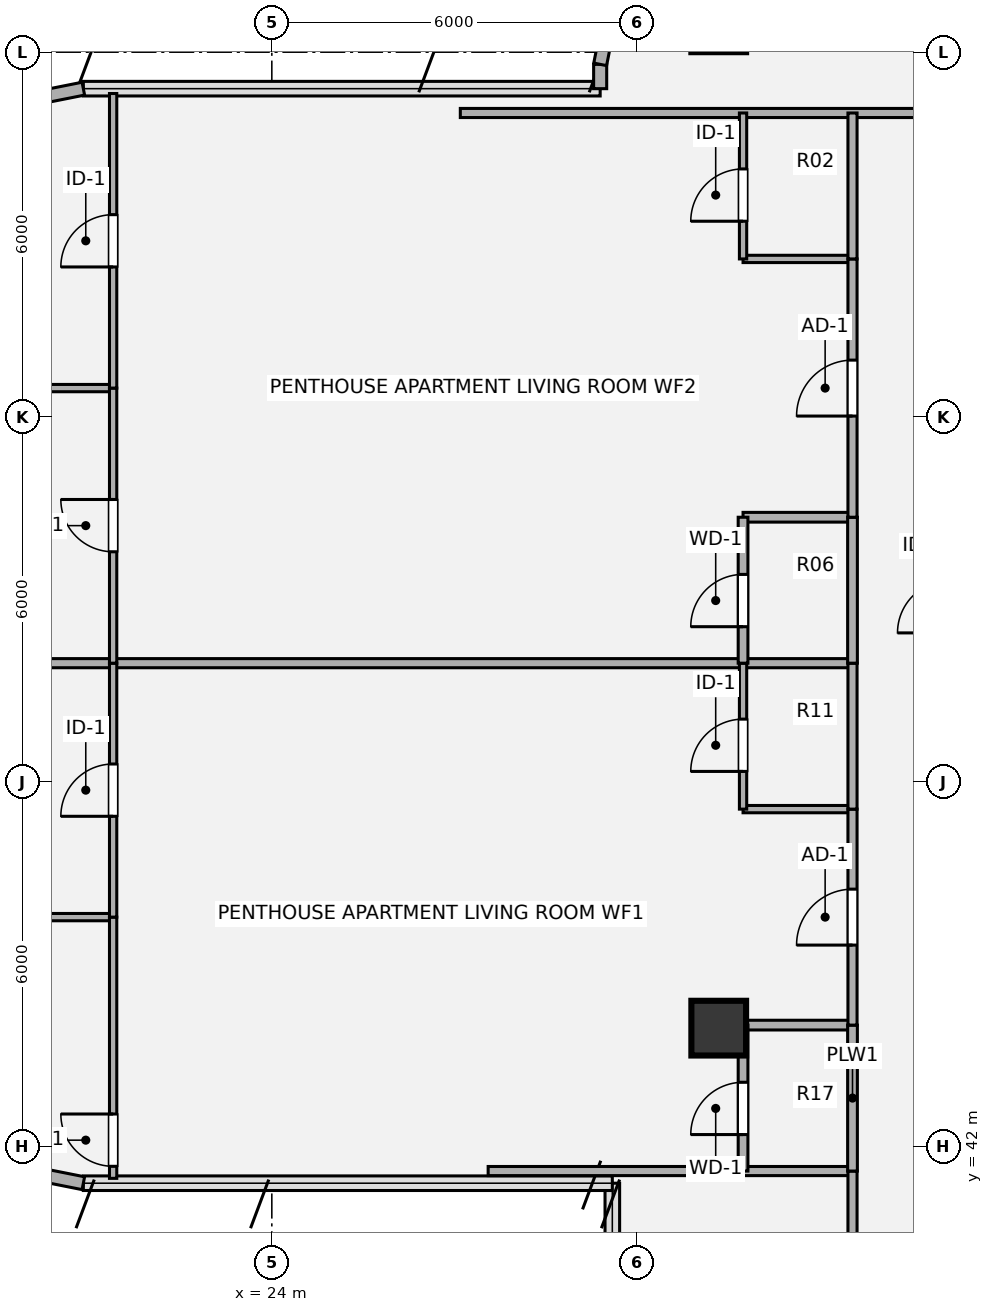
"""IFC4 building model, lengths in metres.
Left out: names, types, materials, properties, quantities, classifications, styles, units other than length and angle.
Written with IfcOpenShell. Run it as: python <this file> out.ifc"""

import sys

from ifc_helpers import new_model, si_unit, direction, frame, frame_2d, origin, origin_2d, place, context, subcontext, project, spatial, rectangle, hollow_circle, extrude, source, transform, mapped, element, fill, save


model = new_model("IFC4")
c1 = context("Model", 3, precision=1e-05, world=origin(), true_north=direction((0.0, 1.0)))
c2 = subcontext(c1, "Body", "Model", "MODEL_VIEW")
j1 = project(units=[si_unit("LENGTHUNIT", "METRE"), si_unit("PLANEANGLEUNIT", "RADIAN")], contexts=[c1])
p1 = place(None, origin())
s1 = spatial("IfcSite", under=j1, at=p1, CompositionType="ELEMENT")
p2 = place(p1, origin())
s2 = spatial("IfcBuilding", under=s1, at=p2, CompositionType="ELEMENT")
p3 = place(p2, frame((0.0, 0.0, 223.02)))
s3 = spatial("IfcBuildingStorey", under=s2, at=p3, CompositionType="ELEMENT", Elevation=223.02)
m1 = source(origin(), c2, "Body", "SweptSolid", [
    extrude(hollow_circle(Radius=0.45, WallThickness=0.032, at=origin_2d()), origin(), (0.0, 0.0, 1.0), 3.78),
])
p4 = place(p3, frame((31.35, 43.95, 0.0), z_axis=(0.0, 0.0, 1.0), x_axis=(1.0, 0.0, 0.0)))
e1 = element("IfcColumn", 1, at=p4, inside=s3, PredefinedType="COLUMN", context=c2, shape_type="MappedRepresentation", body=[
    mapped(m1, transform((0.0, 0.0, 0.0), x_axis=(1.0, 0.0, 0.0), y_axis=(0.0, 1.0, 0.0), z_axis=(0.0, 0.0, 1.0), scale=1.0)),
])
for number, where, z_axis, x_axis in (
    (2, (20.9, 41.4, 0.0), (0.0, 0.0, 1.0), (-0.981, 0.195, 0.0)),
    (3, (19.675, 59.156, 0.0), (0.0, 0.0, 1.0), (0.981, 0.195, 0.0)),
):
    element("IfcWall", number, at=place(p3, frame(where, z_axis=z_axis, x_axis=x_axis)), inside=s3, PredefinedType="SOLIDWALL", context=c2, shape_type="SweptSolid", body=[
        extrude(rectangle(XDim=1.249, YDim=0.215, at=frame_2d((0.624, 0.0))), origin(), (0.0, 0.0, 1.0), 3.53),
    ])
p5 = place(p3, frame((29.4, 59.4, 0.0), z_axis=(0.0, 0.0, 1.0), x_axis=(0.0, 1.0, 0.0)))
e4 = element("IfcWall", 4, at=p5, inside=s3, PredefinedType="SOLIDWALL", context=c2, shape_type="SweptSolid", body=[
    extrude(rectangle(XDim=0.4, YDim=0.215, at=frame_2d((0.2, 0.0))), origin(), (0.0, 0.0, 1.0), 3.53),
])
p6 = place(p3, frame((29.4, 59.8, 0.0), z_axis=(0.0, 0.0, 1.0), x_axis=(0.195190360752, 0.980765376158, 0.0)))
e5 = element("IfcWall", 5, at=p6, inside=s3, PredefinedType="SOLIDWALL", context=c2, shape_type="SweptSolid", body=[
    extrude(rectangle(XDim=1.014, YDim=0.215, at=frame_2d((0.507, 0.0))), origin(), (0.0, 0.0, 1.0), 3.53),
])
p7 = place(p3, frame((27.558, 41.6, 0.0), z_axis=(0.0, 0.0, 1.0), x_axis=(1.0, 0.0, 0.0)))
e6 = element("IfcWall", 6, at=p7, inside=s3, PredefinedType="PARTITIONING", context=c2, shape_type="SweptSolid", body=[
    extrude(rectangle(XDim=5.992, YDim=0.15, at=frame_2d((2.996, 0.0))), origin(), (0.0, 0.0, 1.0), 3.5),
])
p8 = place(p3, frame((31.75, 44.0, 0.0), z_axis=(0.0, 0.0, 1.0), x_axis=(1.0, 0.0, 0.0)))
e7 = element("IfcWall", 7, at=p8, inside=s3, PredefinedType="PLUMBINGWALL", context=c2, shape_type="SweptSolid", body=[
    extrude(rectangle(XDim=1.8, YDim=0.16, at=frame_2d((0.9, 0.0))), origin(), (0.0, 0.0, 1.0), 2.903),
])
p9 = place(p3, frame((17.78, 45.776, 0.0), z_axis=(0.0, 0.0, 1.0), x_axis=(1.0, 0.0, 0.0)))
e8 = element("IfcWall", 8, at=p9, inside=s3, PredefinedType="PARTITIONING", context=c2, shape_type="SweptSolid", body=[
    extrude(rectangle(XDim=3.61, YDim=0.12, at=frame_2d((1.805, 0.0))), origin(), (0.0, 0.0, 1.0), 2.982),
])
p10 = place(p3, frame((31.75, 47.552, 0.0), z_axis=(0.0, 0.0, 1.0), x_axis=(1.0, 0.0, 0.0)))
e9 = element("IfcWall", 9, at=p10, inside=s3, PredefinedType="PARTITIONING", context=c2, shape_type="SweptSolid", body=[
    extrude(rectangle(XDim=1.8, YDim=0.12, at=frame_2d((0.9, 0.0))), origin(), (0.0, 0.0, 1.0), 3.259),
])
p11 = place(p3, frame((17.78, 49.952, 0.0), z_axis=(0.0, 0.0, 1.0), x_axis=(1.0, 0.0, 0.0)))
e10 = element("IfcWall", 10, at=p11, inside=s3, PredefinedType="PARTITIONING", context=c2, shape_type="SweptSolid", body=[
    extrude(rectangle(XDim=15.77, YDim=0.15, at=frame_2d((7.885, 0.0))), origin(), (0.0, 0.0, 1.0), 2.982),
])
p12 = place(p3, frame((31.75, 52.352, 0.0), z_axis=(0.0, 0.0, 1.0), x_axis=(1.0, 0.0, 0.0)))
e11 = element("IfcWall", 11, at=p12, inside=s3, PredefinedType="PLUMBINGWALL", context=c2, shape_type="SweptSolid", body=[
    extrude(rectangle(XDim=1.8, YDim=0.16, at=frame_2d((0.9, 0.0))), origin(), (0.0, 0.0, 1.0), 3.259),
])
p13 = place(p3, frame((17.78, 54.476, 0.0), z_axis=(0.0, 0.0, 1.0), x_axis=(1.0, 0.0, 0.0)))
e12 = element("IfcWall", 12, at=p13, inside=s3, PredefinedType="PARTITIONING", context=c2, shape_type="SweptSolid", body=[
    extrude(rectangle(XDim=3.61, YDim=0.12, at=frame_2d((1.805, 0.0))), origin(), (0.0, 0.0, 1.0), 2.903),
])
p14 = place(p3, frame((31.75, 56.6, 0.0), z_axis=(0.0, 0.0, 1.0), x_axis=(1.0, 0.0, 0.0)))
e13 = element("IfcWall", 13, at=p14, inside=s3, PredefinedType="PARTITIONING", context=c2, shape_type="SweptSolid", body=[
    extrude(rectangle(XDim=1.8, YDim=0.12, at=frame_2d((0.9, 0.0))), origin(), (0.0, 0.0, 1.0), 3.259),
])
p15 = place(p3, frame((27.1, 59.0, 0.0), z_axis=(0.0, 0.0, 1.0), x_axis=(1.0, 0.0, 0.0)))
e14 = element("IfcWall", 14, at=p15, inside=s3, PredefinedType="PARTITIONING", context=c2, shape_type="SweptSolid", body=[
    extrude(rectangle(XDim=17.8, YDim=0.15, at=frame_2d((8.9, 0.0))), origin(), (0.0, 0.0, 1.0), 3.308),
])
p16 = place(p15, frame((8.375, 0.0, 0.0)))
e15 = element("IfcOpeningElement", 15, at=p16, cuts=e14, PredefinedType="OPENING", context=c2, shape_type="SweptSolid", body=[
    extrude(rectangle(XDim=1.05, YDim=2.1, at=origin_2d()), frame((0.525, 0.085, 1.05), z_axis=(0.0, -1.0, 0.0), x_axis=(1.0, 0.0, 0.0)), (0.0, 0.0, 1.0), 0.17),
])
p17 = place(p3, frame((21.39, 41.48, 0.0), z_axis=(0.0, 0.0, 1.0), x_axis=(0.0, 1.0, 0.0)))
e16 = element("IfcWall", 16, at=p17, inside=s3, PredefinedType="PARTITIONING", context=c2, shape_type="SweptSolid", body=[
    extrude(rectangle(XDim=4.296, YDim=0.12, at=frame_2d((2.148, 0.0))), origin(), (0.0, 0.0, 1.0), 3.5),
])
p18 = place(p17, frame((0.198, 0.0, 0.0)))
e17 = element("IfcOpeningElement", 17, at=p18, cuts=e16, PredefinedType="OPENING", context=c2, shape_type="SweptSolid", body=[
    extrude(rectangle(XDim=0.86, YDim=2.1, at=origin_2d()), frame((0.43, 0.07, 1.05), z_axis=(0.0, -1.0, 0.0), x_axis=(1.0, 0.0, 0.0)), (0.0, 0.0, 1.0), 0.14),
])
p19 = place(p3, frame((21.39, 45.776, 0.0), z_axis=(0.0, 0.0, 1.0), x_axis=(0.0, 1.0, 0.0)))
e18 = element("IfcWall", 18, at=p19, inside=s3, PredefinedType="PARTITIONING", context=c2, shape_type="SweptSolid", body=[
    extrude(rectangle(XDim=4.176, YDim=0.12, at=frame_2d((2.088, 0.0))), origin(), (0.0, 0.0, 1.0), 3.5),
])
p20 = place(p19, frame((1.658, 0.0, 0.0)))
e19 = element("IfcOpeningElement", 19, at=p20, cuts=e18, PredefinedType="OPENING", context=c2, shape_type="SweptSolid", body=[
    extrude(rectangle(XDim=0.86, YDim=2.1, at=origin_2d()), frame((0.43, 0.07, 1.05), z_axis=(0.0, -1.0, 0.0), x_axis=(1.0, 0.0, 0.0)), (0.0, 0.0, 1.0), 0.14),
])
p21 = place(p3, frame((21.39, 49.952, 0.0), z_axis=(0.0, 0.0, 1.0), x_axis=(0.0, 1.0, 0.0)))
e20 = element("IfcWall", 20, at=p21, inside=s3, PredefinedType="PARTITIONING", context=c2, shape_type="SweptSolid", body=[
    extrude(rectangle(XDim=4.524, YDim=0.12, at=frame_2d((2.262, 0.0))), origin(), (0.0, 0.0, 1.0), 3.5),
])
p22 = place(p21, frame((1.832, 0.0, 0.0)))
e21 = element("IfcOpeningElement", 21, at=p22, cuts=e20, PredefinedType="OPENING", context=c2, shape_type="SweptSolid", body=[
    extrude(rectangle(XDim=0.86, YDim=2.1, at=origin_2d()), frame((0.43, 0.07, 1.05), z_axis=(0.0, -1.0, 0.0), x_axis=(1.0, 0.0, 0.0)), (0.0, 0.0, 1.0), 0.14),
])
p23 = place(p3, frame((21.39, 54.476, 0.0), z_axis=(0.0, 0.0, 1.0), x_axis=(0.0, 1.0, 0.0)))
e22 = element("IfcWall", 22, at=p23, inside=s3, PredefinedType="PARTITIONING", context=c2, shape_type="SweptSolid", body=[
    extrude(rectangle(XDim=4.844, YDim=0.12, at=frame_2d((2.422, 0.0))), origin(), (0.0, 0.0, 1.0), 3.5),
])
p24 = place(p23, frame((1.992, 0.0, 0.0)))
e23 = element("IfcOpeningElement", 23, at=p24, cuts=e22, PredefinedType="OPENING", context=c2, shape_type="SweptSolid", body=[
    extrude(rectangle(XDim=0.86, YDim=2.1, at=origin_2d()), frame((0.43, 0.07, 1.05), z_axis=(0.0, -1.0, 0.0), x_axis=(1.0, 0.0, 0.0)), (0.0, 0.0, 1.0), 0.14),
])
p25 = place(p3, frame((31.75, 41.6, 0.0), z_axis=(0.0, 0.0, 1.0), x_axis=(0.0, 1.0, 0.0)))
e24 = element("IfcWall", 24, at=p25, inside=s3, PredefinedType="PLUMBINGWALL", context=c2, shape_type="SweptSolid", body=[
    extrude(rectangle(XDim=2.4, YDim=0.16, at=frame_2d((1.2, 0.0))), origin(), (0.0, 0.0, 1.0), 3.5),
])
p26 = place(p25, frame((0.6, 0.0, 0.0)))
e25 = element("IfcOpeningElement", 25, at=p26, cuts=e24, PredefinedType="OPENING", context=c2, shape_type="SweptSolid", body=[
    extrude(rectangle(XDim=0.86, YDim=2.1, at=origin_2d()), frame((0.43, 0.09, 1.05), z_axis=(0.0, -1.0, 0.0), x_axis=(1.0, 0.0, 0.0)), (0.0, 0.0, 1.0), 0.18),
])
p27 = place(p3, frame((31.75, 47.552, 0.0), z_axis=(0.0, 0.0, 1.0), x_axis=(0.0, 1.0, 0.0)))
e26 = element("IfcWall", 26, at=p27, inside=s3, PredefinedType="PARTITIONING", context=c2, shape_type="SweptSolid", body=[
    extrude(rectangle(XDim=2.4, YDim=0.12, at=frame_2d((1.2, 0.0))), origin(), (0.0, 0.0, 1.0), 3.5),
])
p28 = place(p27, frame((0.62, 0.0, 0.0)))
e27 = element("IfcOpeningElement", 27, at=p28, cuts=e26, PredefinedType="OPENING", context=c2, shape_type="SweptSolid", body=[
    extrude(rectangle(XDim=0.86, YDim=2.1, at=origin_2d()), frame((0.43, 0.07, 1.05), z_axis=(0.0, -1.0, 0.0), x_axis=(1.0, 0.0, 0.0)), (0.0, 0.0, 1.0), 0.14),
])
p29 = place(p3, frame((31.75, 49.952, 0.0), z_axis=(0.0, 0.0, 1.0), x_axis=(0.0, 1.0, 0.0)))
e28 = element("IfcWall", 28, at=p29, inside=s3, PredefinedType="PLUMBINGWALL", context=c2, shape_type="SweptSolid", body=[
    extrude(rectangle(XDim=2.4, YDim=0.16, at=frame_2d((1.2, 0.0))), origin(), (0.0, 0.0, 1.0), 3.5),
])
p30 = place(p29, frame((0.6, 0.0, 0.0)))
e29 = element("IfcOpeningElement", 29, at=p30, cuts=e28, PredefinedType="OPENING", context=c2, shape_type="SweptSolid", body=[
    extrude(rectangle(XDim=0.86, YDim=2.1, at=origin_2d()), frame((0.43, 0.09, 1.05), z_axis=(0.0, -1.0, 0.0), x_axis=(1.0, 0.0, 0.0)), (0.0, 0.0, 1.0), 0.18),
])
p31 = place(p3, frame((31.75, 56.6, 0.0), z_axis=(0.0, 0.0, 1.0), x_axis=(0.0, 1.0, 0.0)))
e30 = element("IfcWall", 30, at=p31, inside=s3, PredefinedType="PARTITIONING", context=c2, shape_type="SweptSolid", body=[
    extrude(rectangle(XDim=2.4, YDim=0.12, at=frame_2d((1.2, 0.0))), origin(), (0.0, 0.0, 1.0), 3.5),
])
p32 = place(p31, frame((0.62, 0.0, 0.0)))
e31 = element("IfcOpeningElement", 31, at=p32, cuts=e30, PredefinedType="OPENING", context=c2, shape_type="SweptSolid", body=[
    extrude(rectangle(XDim=0.86, YDim=2.1, at=origin_2d()), frame((0.43, 0.07, 1.05), z_axis=(0.0, -1.0, 0.0), x_axis=(1.0, 0.0, 0.0)), (0.0, 0.0, 1.0), 0.14),
])
p33 = place(p3, frame((33.55, 21.2, 0.0), z_axis=(0.0, 0.0, 1.0), x_axis=(0.0, 1.0, 0.0)))
e32 = element("IfcWall", 32, at=p33, inside=s3, PredefinedType="PARTITIONING", context=c2, shape_type="SweptSolid", body=[
    extrude(rectangle(XDim=20.4, YDim=0.15, at=frame_2d((10.2, 0.0))), origin(), (0.0, 0.0, 1.0), 3.5),
])
p34 = place(p33, frame((9.64, 0.0, 0.0)))
e33 = element("IfcOpeningElement", 33, at=p34, cuts=e32, PredefinedType="OPENING", context=c2, shape_type="SweptSolid", body=[
    extrude(rectangle(XDim=0.86, YDim=2.1, at=origin_2d()), frame((0.43, 0.085, 1.05), z_axis=(0.0, -1.0, 0.0), x_axis=(1.0, 0.0, 0.0)), (0.0, 0.0, 1.0), 0.17),
])
p35 = place(p3, frame((33.55, 41.6, 0.0), z_axis=(0.0, 0.0, 1.0), x_axis=(0.0, 1.0, 0.0)))
e34 = element("IfcWall", 34, at=p35, inside=s3, PredefinedType="PLUMBINGWALL", context=c2, shape_type="SweptSolid", body=[
    extrude(rectangle(XDim=2.4, YDim=0.16, at=frame_2d((1.2, 0.0))), origin(), (0.0, 0.0, 1.0), 3.5),
])
p36 = place(p3, frame((33.55, 44.0, 0.0), z_axis=(0.0, 0.0, 1.0), x_axis=(0.0, 1.0, 0.0)))
e35 = element("IfcWall", 35, at=p36, inside=s3, PredefinedType="PARTITIONING", context=c2, shape_type="SweptSolid", body=[
    extrude(rectangle(XDim=3.552, YDim=0.15, at=frame_2d((1.776, 0.0))), origin(), (0.0, 0.0, 1.0), 3.5),
])
p37 = place(p36, frame((1.316, 0.0, 0.0)))
e36 = element("IfcOpeningElement", 36, at=p37, cuts=e35, PredefinedType="OPENING", context=c2, shape_type="SweptSolid", body=[
    extrude(rectangle(XDim=0.92, YDim=2.1, at=origin_2d()), frame((0.46, 0.085, 1.05), z_axis=(0.0, -1.0, 0.0), x_axis=(1.0, 0.0, 0.0)), (0.0, 0.0, 1.0), 0.17),
])
p38 = place(p3, frame((33.55, 47.552, 0.0), z_axis=(0.0, 0.0, 1.0), x_axis=(0.0, 1.0, 0.0)))
e37 = element("IfcWall", 37, at=p38, inside=s3, PredefinedType="PARTITIONING", context=c2, shape_type="SweptSolid", body=[
    extrude(rectangle(XDim=2.4, YDim=0.15, at=frame_2d((1.2, 0.0))), origin(), (0.0, 0.0, 1.0), 3.5),
])
p39 = place(p3, frame((33.55, 49.952, 0.0), z_axis=(0.0, 0.0, 1.0), x_axis=(0.0, 1.0, 0.0)))
e38 = element("IfcWall", 38, at=p39, inside=s3, PredefinedType="PLUMBINGWALL", context=c2, shape_type="SweptSolid", body=[
    extrude(rectangle(XDim=2.4, YDim=0.16, at=frame_2d((1.2, 0.0))), origin(), (0.0, 0.0, 1.0), 3.5),
])
p40 = place(p3, frame((33.55, 52.352, 0.0), z_axis=(0.0, 0.0, 1.0), x_axis=(0.0, 1.0, 0.0)))
e39 = element("IfcWall", 39, at=p40, inside=s3, PredefinedType="PARTITIONING", context=c2, shape_type="SweptSolid", body=[
    extrude(rectangle(XDim=4.248, YDim=0.15, at=frame_2d((2.124, 0.0))), origin(), (0.0, 0.0, 1.0), 3.5),
])
p41 = place(p40, frame((1.664, 0.0, 0.0)))
e40 = element("IfcOpeningElement", 40, at=p41, cuts=e39, PredefinedType="OPENING", context=c2, shape_type="SweptSolid", body=[
    extrude(rectangle(XDim=0.92, YDim=2.1, at=origin_2d()), frame((0.46, 0.085, 1.05), z_axis=(0.0, -1.0, 0.0), x_axis=(1.0, 0.0, 0.0)), (0.0, 0.0, 1.0), 0.17),
])
p42 = place(p3, frame((33.55, 56.6, 0.0), z_axis=(0.0, 0.0, 1.0), x_axis=(0.0, 1.0, 0.0)))
e41 = element("IfcWall", 41, at=p42, inside=s3, PredefinedType="PARTITIONING", context=c2, shape_type="SweptSolid", body=[
    extrude(rectangle(XDim=2.4, YDim=0.15, at=frame_2d((1.2, 0.0))), origin(), (0.0, 0.0, 1.0), 3.5),
])
m2 = source(origin(), c2, "Body", "SweptSolid", [
    extrude(rectangle(XDim=0.86, YDim=2.1, at=origin_2d()), frame((0.43, 0.025, 1.05), z_axis=(0.0, -1.0, 0.0), x_axis=(1.0, 0.0, 0.0)), (0.0, 0.0, 1.0), 0.05),
])
p43 = place(p18, origin())
e42 = element("IfcDoor", 42, at=p43, inside=s3, OperationType="SINGLE_SWING_RIGHT", PredefinedType="DOOR", context=c2, shape_type="MappedRepresentation", body=[
    mapped(m2, transform((0.0, 0.0, 0.0), x_axis=(1.0, 0.0, 0.0), y_axis=(0.0, 1.0, 0.0), z_axis=(0.0, 0.0, 1.0), scale=1.0)),
])
fill(e17, e42)
p44 = place(p20, origin())
e43 = element("IfcDoor", 43, at=p44, inside=s3, OperationType="SINGLE_SWING_LEFT", PredefinedType="DOOR", context=c2, shape_type="MappedRepresentation", body=[
    mapped(m2, transform((0.0, 0.0, 0.0), x_axis=(1.0, 0.0, 0.0), y_axis=(0.0, 1.0, 0.0), z_axis=(0.0, 0.0, 1.0), scale=1.0)),
])
fill(e19, e43)
p45 = place(p22, origin())
e44 = element("IfcDoor", 44, at=p45, inside=s3, OperationType="SINGLE_SWING_RIGHT", PredefinedType="DOOR", context=c2, shape_type="MappedRepresentation", body=[
    mapped(m2, transform((0.0, 0.0, 0.0), x_axis=(1.0, 0.0, 0.0), y_axis=(0.0, 1.0, 0.0), z_axis=(0.0, 0.0, 1.0), scale=1.0)),
])
fill(e21, e44)
p46 = place(p24, origin())
e45 = element("IfcDoor", 45, at=p46, inside=s3, OperationType="SINGLE_SWING_LEFT", PredefinedType="DOOR", context=c2, shape_type="MappedRepresentation", body=[
    mapped(m2, transform((0.0, 0.0, 0.0), x_axis=(1.0, 0.0, 0.0), y_axis=(0.0, 1.0, 0.0), z_axis=(0.0, 0.0, 1.0), scale=1.0)),
])
fill(e23, e45)
m3 = source(origin(), c2, "Body", "SweptSolid", [
    extrude(rectangle(XDim=0.86, YDim=2.1, at=origin_2d()), frame((0.43, 0.025, 1.05), z_axis=(0.0, -1.0, 0.0), x_axis=(1.0, 0.0, 0.0)), (0.0, 0.0, 1.0), 0.05),
])
p47 = place(p26, origin())
e46 = element("IfcDoor", 46, at=p47, inside=s3, OperationType="SINGLE_SWING_LEFT", PredefinedType="DOOR", context=c2, shape_type="MappedRepresentation", body=[
    mapped(m3, transform((0.0, 0.0, 0.0), x_axis=(1.0, 0.0, 0.0), y_axis=(0.0, 1.0, 0.0), z_axis=(0.0, 0.0, 1.0), scale=1.0)),
])
fill(e25, e46)
p48 = place(p28, origin())
e47 = element("IfcDoor", 47, at=p48, inside=s3, OperationType="SINGLE_SWING_LEFT", PredefinedType="DOOR", context=c2, shape_type="MappedRepresentation", body=[
    mapped(m2, transform((0.0, 0.0, 0.0), x_axis=(1.0, 0.0, 0.0), y_axis=(0.0, 1.0, 0.0), z_axis=(0.0, 0.0, 1.0), scale=1.0)),
])
fill(e27, e47)
p49 = place(p30, origin())
e48 = element("IfcDoor", 48, at=p49, inside=s3, OperationType="SINGLE_SWING_LEFT", PredefinedType="DOOR", context=c2, shape_type="MappedRepresentation", body=[
    mapped(m3, transform((0.0, 0.0, 0.0), x_axis=(1.0, 0.0, 0.0), y_axis=(0.0, 1.0, 0.0), z_axis=(0.0, 0.0, 1.0), scale=1.0)),
])
fill(e29, e48)
p50 = place(p32, origin())
e49 = element("IfcDoor", 49, at=p50, inside=s3, OperationType="SINGLE_SWING_LEFT", PredefinedType="DOOR", context=c2, shape_type="MappedRepresentation", body=[
    mapped(m2, transform((0.0, 0.0, 0.0), x_axis=(1.0, 0.0, 0.0), y_axis=(0.0, 1.0, 0.0), z_axis=(0.0, 0.0, 1.0), scale=1.0)),
])
fill(e31, e49)
m4 = source(origin(), c2, "Body", "SweptSolid", [
    extrude(rectangle(XDim=0.92, YDim=2.1, at=origin_2d()), frame((0.46, 0.025, 1.05), z_axis=(0.0, -1.0, 0.0), x_axis=(1.0, 0.0, 0.0)), (0.0, 0.0, 1.0), 0.05),
])
p51 = place(p37, origin())
e50 = element("IfcDoor", 50, at=p51, inside=s3, OperationType="SINGLE_SWING_LEFT", PredefinedType="DOOR", context=c2, shape_type="MappedRepresentation", body=[
    mapped(m4, transform((0.0, 0.0, 0.0), x_axis=(1.0, 0.0, 0.0), y_axis=(0.0, 1.0, 0.0), z_axis=(0.0, 0.0, 1.0), scale=1.0)),
])
fill(e36, e50)
p52 = place(p41, origin())
e51 = element("IfcDoor", 51, at=p52, inside=s3, OperationType="SINGLE_SWING_LEFT", PredefinedType="DOOR", context=c2, shape_type="MappedRepresentation", body=[
    mapped(m4, transform((0.0, 0.0, 0.0), x_axis=(1.0, 0.0, 0.0), y_axis=(0.0, 1.0, 0.0), z_axis=(0.0, 0.0, 1.0), scale=1.0)),
])
fill(e40, e51)
save(model, sys.argv[1])
